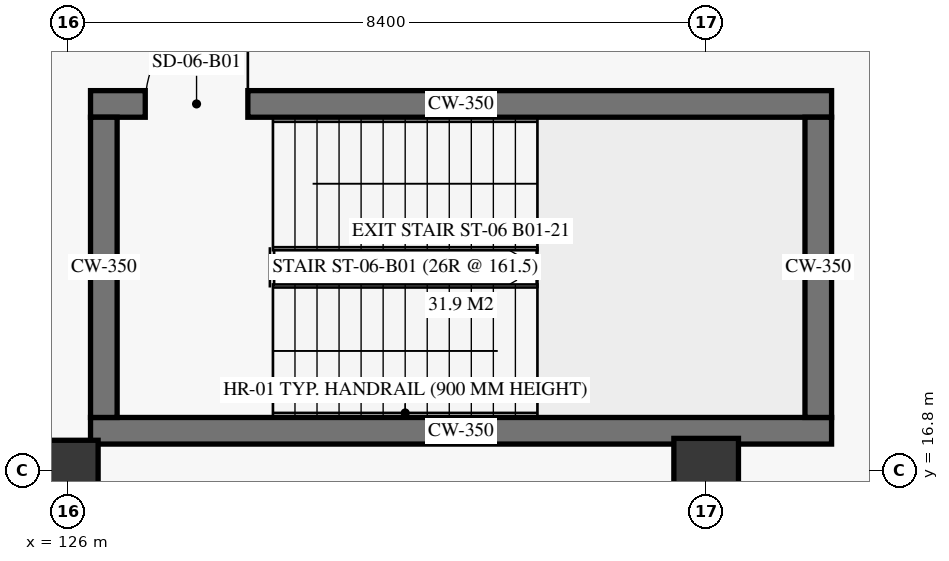
"""IFC4 building model, lengths in metres.
Left out: names, types, materials, properties, quantities, classifications, styles, units other than length and angle.
Written with IfcOpenShell. Run it as: python <this file> out.ifc"""

import sys

from ifc_helpers import new_model, si_unit, direction, frame, frame_2d, origin, origin_2d, place, context, subcontext, project, spatial, rectangle, extrude, element, fill, save


model = new_model("IFC4")
c1 = context("Model", 3, precision=1e-05, world=origin(), true_north=direction((0.0, 1.0)))
c2 = subcontext(c1, "Body", "Model", "MODEL_VIEW")
j1 = project(units=[si_unit("LENGTHUNIT", "METRE"), si_unit("PLANEANGLEUNIT", "RADIAN")], contexts=[c1])
p1 = place(None, origin())
s1 = spatial("IfcSite", under=j1, at=p1, CompositionType="ELEMENT")
p2 = place(p1, origin())
s2 = spatial("IfcBuilding", under=s1, at=p2, CompositionType="ELEMENT")
p3 = place(p2, frame((0.0, 0.0, -4.2)))
s3 = spatial("IfcBuildingStorey", under=s2, at=p3, CompositionType="ELEMENT", Elevation=-4.2)
p4 = place(p3, frame((126.0, 16.8, 0.0), z_axis=(0.0, 0.0, 1.0), x_axis=(1.0, 0.0, 0.0)))
e1 = element("IfcColumn", 1, at=p4, inside=s3, PredefinedType="COLUMN", context=c2, shape_type="SweptSolid", body=[
    extrude(rectangle(XDim=0.8, YDim=0.8, at=origin_2d()), origin(), (0.0, 0.0, 1.0), 3.88),
])
p5 = place(p3, frame((134.4, 16.8, 0.0), z_axis=(0.0, 0.0, 1.0), x_axis=(1.0, 0.0, 0.0)))
e2 = element("IfcColumn", 2, at=p5, inside=s3, PredefinedType="COLUMN", context=c2, shape_type="SweptSolid", body=[
    extrude(rectangle(XDim=0.85, YDim=0.85, at=origin_2d()), origin(), (0.0, 0.0, 1.0), 3.88),
])
p6 = place(p3, frame((126.3, 17.325, 0.0), z_axis=(0.0, 0.0, 1.0), x_axis=(1.0, 0.0, 0.0)))
e3 = element("IfcWall", 3, at=p6, inside=s3, PredefinedType="SHEAR", context=c2, shape_type="SweptSolid", body=[
    extrude(rectangle(XDim=9.75, YDim=0.35, at=frame_2d((4.875, 0.0))), origin(), (0.0, 0.0, 1.0), 3.88),
])
p7 = place(p3, frame((126.3, 21.625, 0.0), z_axis=(0.0, 0.0, 1.0), x_axis=(1.0, 0.0, 0.0)))
e4 = element("IfcWall", 4, at=p7, inside=s3, PredefinedType="SHEAR", context=c2, shape_type="SweptSolid", body=[
    extrude(rectangle(XDim=9.75, YDim=0.35, at=frame_2d((4.875, 0.0))), origin(), (0.0, 0.0, 1.0), 3.88),
])
p8 = place(p7, frame((0.72, 0.0, 0.0)))
e5 = element("IfcOpeningElement", 5, at=p8, cuts=e4, PredefinedType="OPENING", context=c2, shape_type="SweptSolid", body=[
    extrude(rectangle(XDim=1.35, YDim=2.25, at=frame_2d((0.675, 1.125))), frame((0.0, 0.185, 0.0), z_axis=(0.0, -1.0, 0.0), x_axis=(1.0, 0.0, 0.0)), (0.0, 0.0, 1.0), 0.37),
])
for number, where, z_axis, x_axis in (
    (6, (126.475, 17.5, 0.0), (0.0, 0.0, 1.0), (0.0, 1.0, 0.0)),
    (7, (135.875, 17.5, 0.0), (0.0, 0.0, 1.0), (0.0, 1.0, 0.0)),
):
    element("IfcWall", number, at=place(p3, frame(where, z_axis=z_axis, x_axis=x_axis)), inside=s3, PredefinedType="SHEAR", context=c2, shape_type="SweptSolid", body=[
        extrude(rectangle(XDim=3.95, YDim=0.35, at=frame_2d((1.975, 0.0))), origin(), (0.0, 0.0, 1.0), 3.88),
    ])
p9 = place(p8, origin())
e8 = element("IfcDoor", 8, at=p9, inside=s3, OperationType="SINGLE_SWING_RIGHT", PredefinedType="DOOR", context=c2, shape_type="SweptSolid", body=[
    extrude(rectangle(XDim=1.35, YDim=2.25, at=frame_2d((0.675, 1.125))), frame((0.0, 0.025, 0.0), z_axis=(0.0, -1.0, 0.0), x_axis=(1.0, 0.0, 0.0)), (0.0, 0.0, 1.0), 0.05),
])
fill(e5, e8)
save(model, sys.argv[1])
